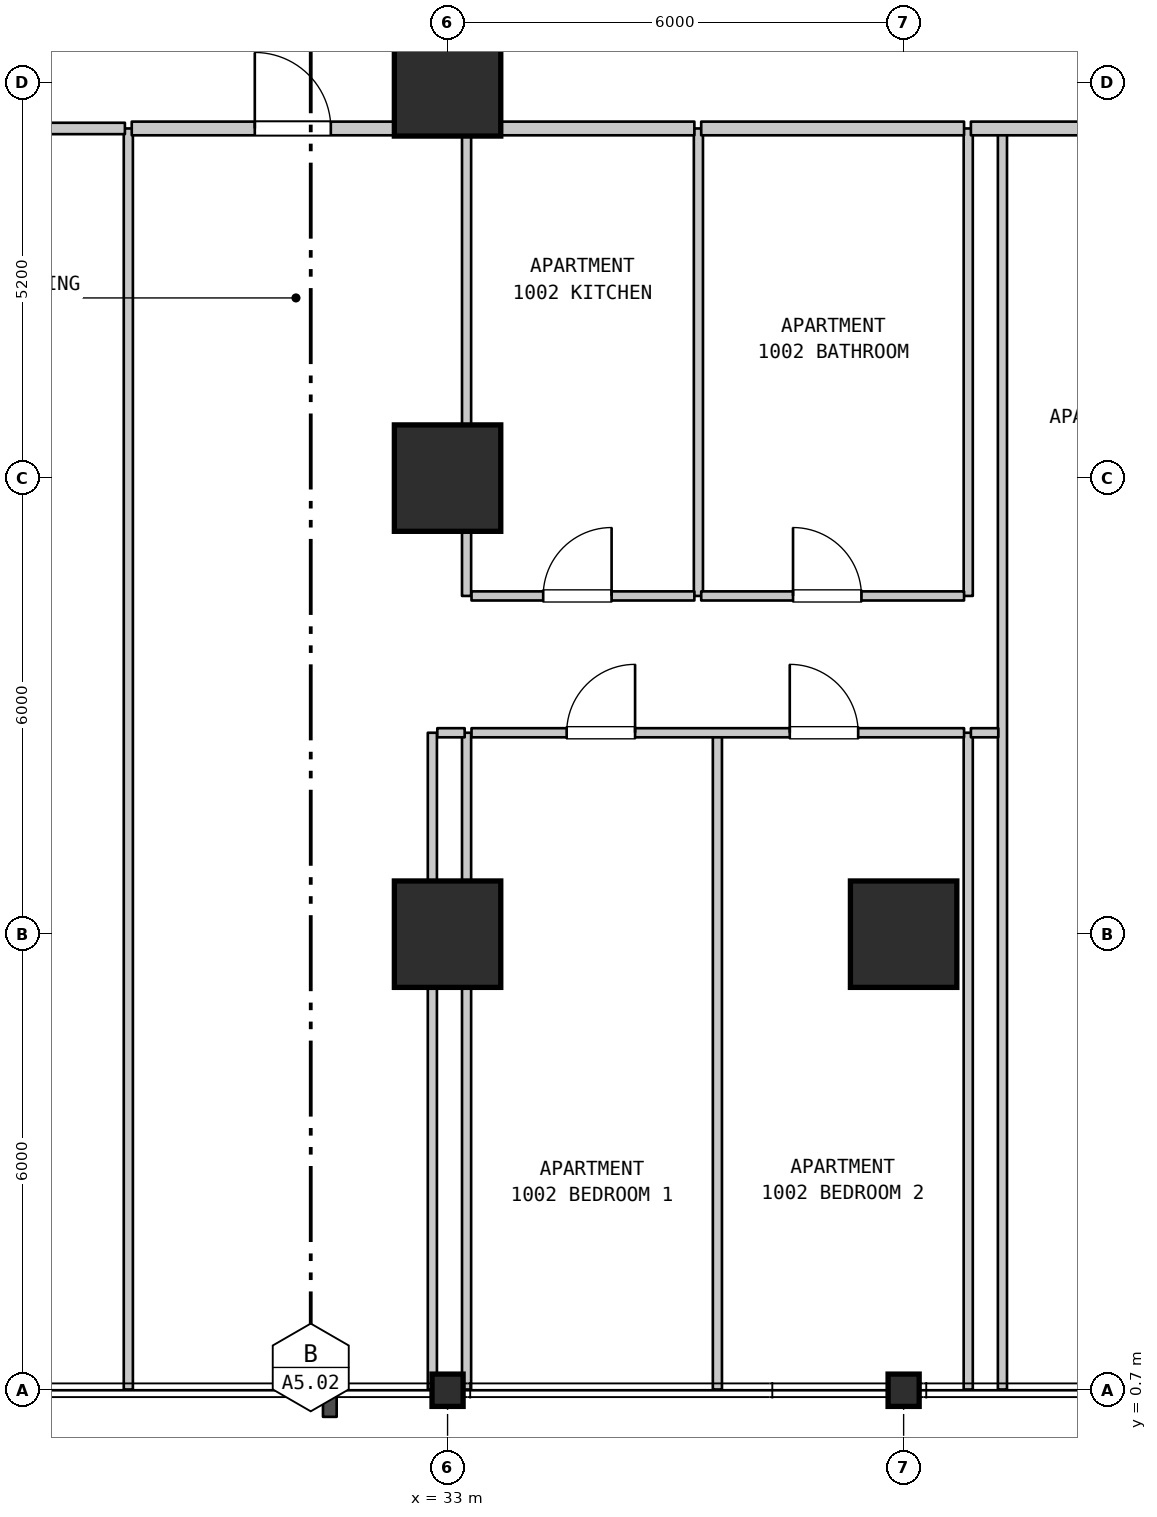
"""IFC4 building model, lengths in metres.
Left out: names, types, materials, properties, quantities, classifications, styles, units other than length and angle.
Written with IfcOpenShell. Run it as: python <this file> out.ifc"""

import sys

from ifc_helpers import new_model, si_unit, direction, frame, frame_2d, origin, origin_2d, place, context, subcontext, project, spatial, rectangle, i_section, extrude, element, fill, save


model = new_model("IFC4")
c1 = context("Model", 3, precision=1e-05, world=origin(), true_north=direction((0.0, 1.0)))
c2 = subcontext(c1, "Body", "Model", "MODEL_VIEW")
j1 = project(units=[si_unit("LENGTHUNIT", "METRE"), si_unit("PLANEANGLEUNIT", "RADIAN")], contexts=[c1])
p1 = place(None, origin())
s1 = spatial("IfcSite", under=j1, at=p1, CompositionType="ELEMENT")
p2 = place(p1, origin())
s2 = spatial("IfcBuilding", under=s1, at=p2, CompositionType="ELEMENT")
p3 = place(p2, frame((0.0, 0.0, 46.2)))
s3 = spatial("IfcBuildingStorey", under=s2, at=p3, CompositionType="ELEMENT", Elevation=46.2)
p4 = place(p3, frame((33.0, 0.7, 0.0), z_axis=(0.0, 0.0, 1.0), x_axis=(1.0, 0.0, 0.0)))
e1 = element("IfcColumn", 1, at=p4, inside=s3, PredefinedType="COLUMN", context=c2, shape_type="SweptSolid", body=[
    extrude(i_section(OverallWidth=0.409, OverallDepth=0.425, WebThickness=0.032, FlangeThickness=0.052, FilletRadius=0.015, at=origin_2d()), origin(), (0.0, 0.0, 1.0), 3.7),
])
for number, where, z_axis, x_axis in (
    (2, (33.0, 6.7, 0.0), (0.0, 0.0, 1.0), (1.0, 0.0, 0.0)),
    (3, (33.0, 12.7, 0.0), (0.0, 0.0, 1.0), (1.0, 0.0, 0.0)),
    (4, (33.0, 17.9, 0.0), (0.0, 0.0, 1.0), (1.0, 0.0, 0.0)),
):
    element("IfcColumn", number, at=place(p3, frame(where, z_axis=z_axis, x_axis=x_axis)), inside=s3, PredefinedType="COLUMN", context=c2, shape_type="SweptSolid", body=[
        extrude(rectangle(XDim=1.4, YDim=1.4, at=origin_2d()), origin(), (0.0, 0.0, 1.0), 3.7),
    ])
p5 = place(p3, frame((39.0, 0.7, 0.0), z_axis=(0.0, 0.0, 1.0), x_axis=(1.0, 0.0, 0.0)))
e5 = element("IfcColumn", 5, at=p5, inside=s3, PredefinedType="COLUMN", context=c2, shape_type="SweptSolid", body=[
    extrude(i_section(OverallWidth=0.409, OverallDepth=0.425, WebThickness=0.032, FlangeThickness=0.052, FilletRadius=0.015, at=origin_2d()), origin(), (0.0, 0.0, 1.0), 3.7),
])
p6 = place(p3, frame((39.0, 6.7, 0.0), z_axis=(0.0, 0.0, 1.0), x_axis=(1.0, 0.0, 0.0)))
e6 = element("IfcColumn", 6, at=p6, inside=s3, PredefinedType="COLUMN", context=c2, shape_type="SweptSolid", body=[
    extrude(rectangle(XDim=1.4, YDim=1.4, at=origin_2d()), origin(), (0.0, 0.0, 1.0), 3.7),
])
p7 = place(p3, frame((28.8, 0.71, 0.0), z_axis=(0.0, 0.0, 1.0), x_axis=(0.0, 1.0, 0.0)))
e7 = element("IfcWall", 7, at=p7, inside=s3, PredefinedType="PARTITIONING", context=c2, shape_type="SweptSolid", body=[
    extrude(rectangle(XDim=16.59, YDim=0.12, at=frame_2d((8.295, 0.0))), origin(), (0.0, 0.0, 1.0), 3.385),
])
for number, where, z_axis, x_axis in (
    (8, (32.8, 0.71, 0.0), (0.0, 0.0, 1.0), (0.0, 1.0, 0.0)),
    (9, (33.25, 0.71, 0.0), (0.0, 0.0, 1.0), (0.0, 1.0, 0.0)),
):
    element("IfcWall", number, at=place(p3, frame(where, z_axis=z_axis, x_axis=x_axis)), inside=s3, PredefinedType="PARTITIONING", context=c2, shape_type="SweptSolid", body=[
        extrude(rectangle(XDim=8.64, YDim=0.12, at=frame_2d((4.32, 0.0))), origin(), (0.0, 0.0, 1.0), 3.385),
    ])
for number, where, z_axis, x_axis in (
    (10, (33.25, 11.15, 0.0), (0.0, 0.0, 1.0), (0.0, 1.0, 0.0)),
    (11, (36.3, 11.15, 0.0), (0.0, 0.0, 1.0), (0.0, 1.0, 0.0)),
):
    element("IfcWall", number, at=place(p3, frame(where, z_axis=z_axis, x_axis=x_axis)), inside=s3, PredefinedType="PARTITIONING", context=c2, shape_type="SweptSolid", body=[
        extrude(rectangle(XDim=6.15, YDim=0.12, at=frame_2d((3.075, 0.0))), origin(), (0.0, 0.0, 1.0), 3.385),
    ])
for number, where, z_axis, x_axis in (
    (12, (36.55, 0.71, 0.0), (0.0, 0.0, 1.0), (0.0, 1.0, 0.0)),
    (13, (39.85, 0.71, 0.0), (0.0, 0.0, 1.0), (0.0, 1.0, 0.0)),
):
    element("IfcWall", number, at=place(p3, frame(where, z_axis=z_axis, x_axis=x_axis)), inside=s3, PredefinedType="PARTITIONING", context=c2, shape_type="SweptSolid", body=[
        extrude(rectangle(XDim=8.64, YDim=0.12, at=frame_2d((4.32, 0.0))), origin(), (0.0, 0.0, 1.0), 3.385),
    ])
p8 = place(p3, frame((39.85, 11.15, 0.0), z_axis=(0.0, 0.0, 1.0), x_axis=(0.0, 1.0, 0.0)))
e14 = element("IfcWall", 14, at=p8, inside=s3, PredefinedType="PARTITIONING", context=c2, shape_type="SweptSolid", body=[
    extrude(rectangle(XDim=6.15, YDim=0.12, at=frame_2d((3.075, 0.0))), origin(), (0.0, 0.0, 1.0), 3.385),
])
p9 = place(p3, frame((40.3, 0.71, 0.0), z_axis=(0.0, 0.0, 1.0), x_axis=(0.0, 1.0, 0.0)))
e15 = element("IfcWall", 15, at=p9, inside=s3, PredefinedType="PARTITIONING", context=c2, shape_type="SweptSolid", body=[
    extrude(rectangle(XDim=16.59, YDim=0.12, at=frame_2d((8.295, 0.0))), origin(), (0.0, 0.0, 1.0), 3.385),
])
p10 = place(p3, frame((32.865, 9.35, 0.0), z_axis=(0.0, 0.0, 1.0), x_axis=(1.0, 0.0, 0.0)))
e16 = element("IfcWall", 16, at=p10, inside=s3, PredefinedType="PARTITIONING", context=c2, shape_type="SweptSolid", body=[
    extrude(rectangle(XDim=0.36, YDim=0.12, at=frame_2d((0.18, 0.0))), origin(), (0.0, 0.0, 1.0), 3.385),
])
p11 = place(p3, frame((33.315, 9.35, 0.0), z_axis=(0.0, 0.0, 1.0), x_axis=(1.0, 0.0, 0.0)))
e17 = element("IfcWall", 17, at=p11, inside=s3, PredefinedType="PARTITIONING", context=c2, shape_type="SweptSolid", body=[
    extrude(rectangle(XDim=6.48, YDim=0.12, at=frame_2d((3.24, 0.0))), origin(), (0.0, 0.0, 1.0), 3.385),
])
p12 = place(p11, frame((1.252, 0.0, 0.0)))
e18 = element("IfcOpeningElement", 18, at=p12, cuts=e17, PredefinedType="OPENING", context=c2, shape_type="SweptSolid", body=[
    extrude(rectangle(XDim=0.9, YDim=2.15, at=frame_2d((0.45, 1.075))), frame((0.0, 0.07, 0.0), z_axis=(0.0, -1.0, 0.0), x_axis=(1.0, 0.0, 0.0)), (0.0, 0.0, 1.0), 0.14),
])
p13 = place(p11, frame((4.187, 0.0, 0.0)))
e19 = element("IfcOpeningElement", 19, at=p13, cuts=e17, PredefinedType="OPENING", context=c2, shape_type="SweptSolid", body=[
    extrude(rectangle(XDim=0.9, YDim=2.15, at=frame_2d((0.45, 1.075))), frame((0.0, 0.07, 0.0), z_axis=(0.0, -1.0, 0.0), x_axis=(1.0, 0.0, 0.0)), (0.0, 0.0, 1.0), 0.14),
])
p14 = place(p3, frame((39.885, 9.35, 0.0), z_axis=(0.0, 0.0, 1.0), x_axis=(1.0, 0.0, 0.0)))
e20 = element("IfcWall", 20, at=p14, inside=s3, PredefinedType="PARTITIONING", context=c2, shape_type="SweptSolid", body=[
    extrude(rectangle(XDim=0.36, YDim=0.12, at=frame_2d((0.18, 0.0))), origin(), (0.0, 0.0, 1.0), 3.385),
])
p15 = place(p3, frame((33.315, 11.15, 0.0), z_axis=(0.0, 0.0, 1.0), x_axis=(1.0, 0.0, 0.0)))
e21 = element("IfcWall", 21, at=p15, inside=s3, PredefinedType="PARTITIONING", context=c2, shape_type="SweptSolid", body=[
    extrude(rectangle(XDim=2.932, YDim=0.12, at=frame_2d((1.466, 0.0))), origin(), (0.0, 0.0, 1.0), 3.385),
])
p16 = place(p15, frame((0.943, 0.0, 0.0)))
e22 = element("IfcOpeningElement", 22, at=p16, cuts=e21, PredefinedType="OPENING", context=c2, shape_type="SweptSolid", body=[
    extrude(rectangle(XDim=0.9, YDim=2.15, at=frame_2d((0.45, 1.075))), frame((0.0, 0.07, 0.0), z_axis=(0.0, -1.0, 0.0), x_axis=(1.0, 0.0, 0.0)), (0.0, 0.0, 1.0), 0.14),
])
p17 = place(p3, frame((36.337, 11.15, 0.0), z_axis=(0.0, 0.0, 1.0), x_axis=(1.0, 0.0, 0.0)))
e23 = element("IfcWall", 23, at=p17, inside=s3, PredefinedType="PARTITIONING", context=c2, shape_type="SweptSolid", body=[
    extrude(rectangle(XDim=3.458, YDim=0.12, at=frame_2d((1.729, 0.0))), origin(), (0.0, 0.0, 1.0), 3.385),
])
p18 = place(p17, frame((1.208, 0.0, 0.0)))
e24 = element("IfcOpeningElement", 24, at=p18, cuts=e23, PredefinedType="OPENING", context=c2, shape_type="SweptSolid", body=[
    extrude(rectangle(XDim=0.9, YDim=2.1, at=frame_2d((0.45, 1.05))), frame((0.0, 0.07, 0.0), z_axis=(0.0, -1.0, 0.0), x_axis=(1.0, 0.0, 0.0)), (0.0, 0.0, 1.0), 0.14),
])
p19 = place(p3, frame((24.545, 17.3, 0.0), z_axis=(0.0, 0.0, 1.0), x_axis=(1.0, 0.0, 0.0)))
e25 = element("IfcWall", 25, at=p19, inside=s3, PredefinedType="STANDARD", context=c2, shape_type="SweptSolid", body=[
    extrude(rectangle(XDim=4.21, YDim=0.15, at=frame_2d((2.105, 0.0))), origin(), (0.0, 0.0, 1.0), 3.385),
])
p20 = place(p19, frame((1.605, 0.0, 0.0)))
e26 = element("IfcOpeningElement", 26, at=p20, cuts=e25, PredefinedType="OPENING", context=c2, shape_type="SweptSolid", body=[
    extrude(rectangle(XDim=1.0, YDim=2.15, at=frame_2d((0.5, 1.075))), frame((0.0, 0.085, 0.0), z_axis=(0.0, -1.0, 0.0), x_axis=(1.0, 0.0, 0.0)), (0.0, 0.0, 1.0), 0.17),
])
p21 = place(p3, frame((28.845, 17.3, 0.0), z_axis=(0.0, 0.0, 1.0), x_axis=(1.0, 0.0, 0.0)))
e27 = element("IfcWall", 27, at=p21, inside=s3, PredefinedType="STANDARD", context=c2, shape_type="SweptSolid", body=[
    extrude(rectangle(XDim=4.38, YDim=0.18, at=frame_2d((2.19, 0.0))), origin(), (0.0, 0.0, 1.0), 3.385),
])
p22 = place(p21, frame((1.619, 0.0, 0.0)))
e28 = element("IfcOpeningElement", 28, at=p22, cuts=e27, PredefinedType="OPENING", context=c2, shape_type="SweptSolid", body=[
    extrude(rectangle(XDim=1.0, YDim=2.15, at=frame_2d((0.5, 1.075))), frame((0.0, 0.1, 0.0), z_axis=(0.0, -1.0, 0.0), x_axis=(1.0, 0.0, 0.0)), (0.0, 0.0, 1.0), 0.2),
])
p23 = place(p3, frame((33.315, 17.3, 0.0), z_axis=(0.0, 0.0, 1.0), x_axis=(1.0, 0.0, 0.0)))
e29 = element("IfcWall", 29, at=p23, inside=s3, PredefinedType="STANDARD", context=c2, shape_type="SweptSolid", body=[
    extrude(rectangle(XDim=2.932, YDim=0.18, at=frame_2d((1.466, 0.0))), origin(), (0.0, 0.0, 1.0), 3.385),
])
p24 = place(p3, frame((36.337, 17.3, 0.0), z_axis=(0.0, 0.0, 1.0), x_axis=(1.0, 0.0, 0.0)))
e30 = element("IfcWall", 30, at=p24, inside=s3, PredefinedType="STANDARD", context=c2, shape_type="SweptSolid", body=[
    extrude(rectangle(XDim=3.458, YDim=0.18, at=frame_2d((1.729, 0.0))), origin(), (0.0, 0.0, 1.0), 3.385),
])
p25 = place(p3, frame((39.885, 17.3, 0.0), z_axis=(0.0, 0.0, 1.0), x_axis=(1.0, 0.0, 0.0)))
e31 = element("IfcWall", 31, at=p25, inside=s3, PredefinedType="STANDARD", context=c2, shape_type="SweptSolid", body=[
    extrude(rectangle(XDim=4.83, YDim=0.18, at=frame_2d((2.415, 0.0))), origin(), (0.0, 0.0, 1.0), 3.385),
])
p26 = place(p25, frame((2.043, 0.0, 0.0)))
e32 = element("IfcOpeningElement", 32, at=p26, cuts=e31, PredefinedType="OPENING", context=c2, shape_type="SweptSolid", body=[
    extrude(rectangle(XDim=1.0, YDim=2.15, at=frame_2d((0.5, 1.075))), frame((0.0, 0.1, 0.0), z_axis=(0.0, -1.0, 0.0), x_axis=(1.0, 0.0, 0.0)), (0.0, 0.0, 1.0), 0.2),
])
p27 = place(p12, origin())
e33 = element("IfcDoor", 33, at=p27, inside=s3, OperationType="SINGLE_SWING_RIGHT", PredefinedType="DOOR", context=c2, shape_type="SweptSolid", body=[
    extrude(rectangle(XDim=0.9, YDim=2.15, at=frame_2d((0.45, 1.075))), frame((0.0, 0.025, 0.0), z_axis=(0.0, -1.0, 0.0), x_axis=(1.0, 0.0, 0.0)), (0.0, 0.0, 1.0), 0.05),
])
fill(e18, e33)
p28 = place(p13, origin())
e34 = element("IfcDoor", 34, at=p28, inside=s3, OperationType="SINGLE_SWING_LEFT", PredefinedType="DOOR", context=c2, shape_type="SweptSolid", body=[
    extrude(rectangle(XDim=0.9, YDim=2.15, at=frame_2d((0.45, 1.075))), frame((0.0, 0.025, 0.0), z_axis=(0.0, -1.0, 0.0), x_axis=(1.0, 0.0, 0.0)), (0.0, 0.0, 1.0), 0.05),
])
fill(e19, e34)
p29 = place(p16, origin())
e35 = element("IfcDoor", 35, at=p29, inside=s3, OperationType="SINGLE_SWING_RIGHT", PredefinedType="DOOR", context=c2, shape_type="SweptSolid", body=[
    extrude(rectangle(XDim=0.9, YDim=2.15, at=frame_2d((0.45, 1.075))), frame((0.0, 0.025, 0.0), z_axis=(0.0, -1.0, 0.0), x_axis=(1.0, 0.0, 0.0)), (0.0, 0.0, 1.0), 0.05),
])
fill(e22, e35)
p30 = place(p18, origin())
e36 = element("IfcDoor", 36, at=p30, inside=s3, OperationType="SINGLE_SWING_LEFT", PredefinedType="DOOR", context=c2, shape_type="SweptSolid", body=[
    extrude(rectangle(XDim=0.9, YDim=2.1, at=frame_2d((0.45, 1.05))), frame((0.0, 0.025, 0.0), z_axis=(0.0, -1.0, 0.0), x_axis=(1.0, 0.0, 0.0)), (0.0, 0.0, 1.0), 0.05),
])
fill(e24, e36)
p31 = place(p22, origin())
e37 = element("IfcDoor", 37, at=p31, inside=s3, OperationType="SINGLE_SWING_LEFT", PredefinedType="DOOR", context=c2, shape_type="SweptSolid", body=[
    extrude(rectangle(XDim=1.0, YDim=2.15, at=frame_2d((0.5, 1.075))), frame((0.0, 0.025, 0.0), z_axis=(0.0, -1.0, 0.0), x_axis=(1.0, 0.0, 0.0)), (0.0, 0.0, 1.0), 0.05),
])
fill(e28, e37)
save(model, sys.argv[1])
